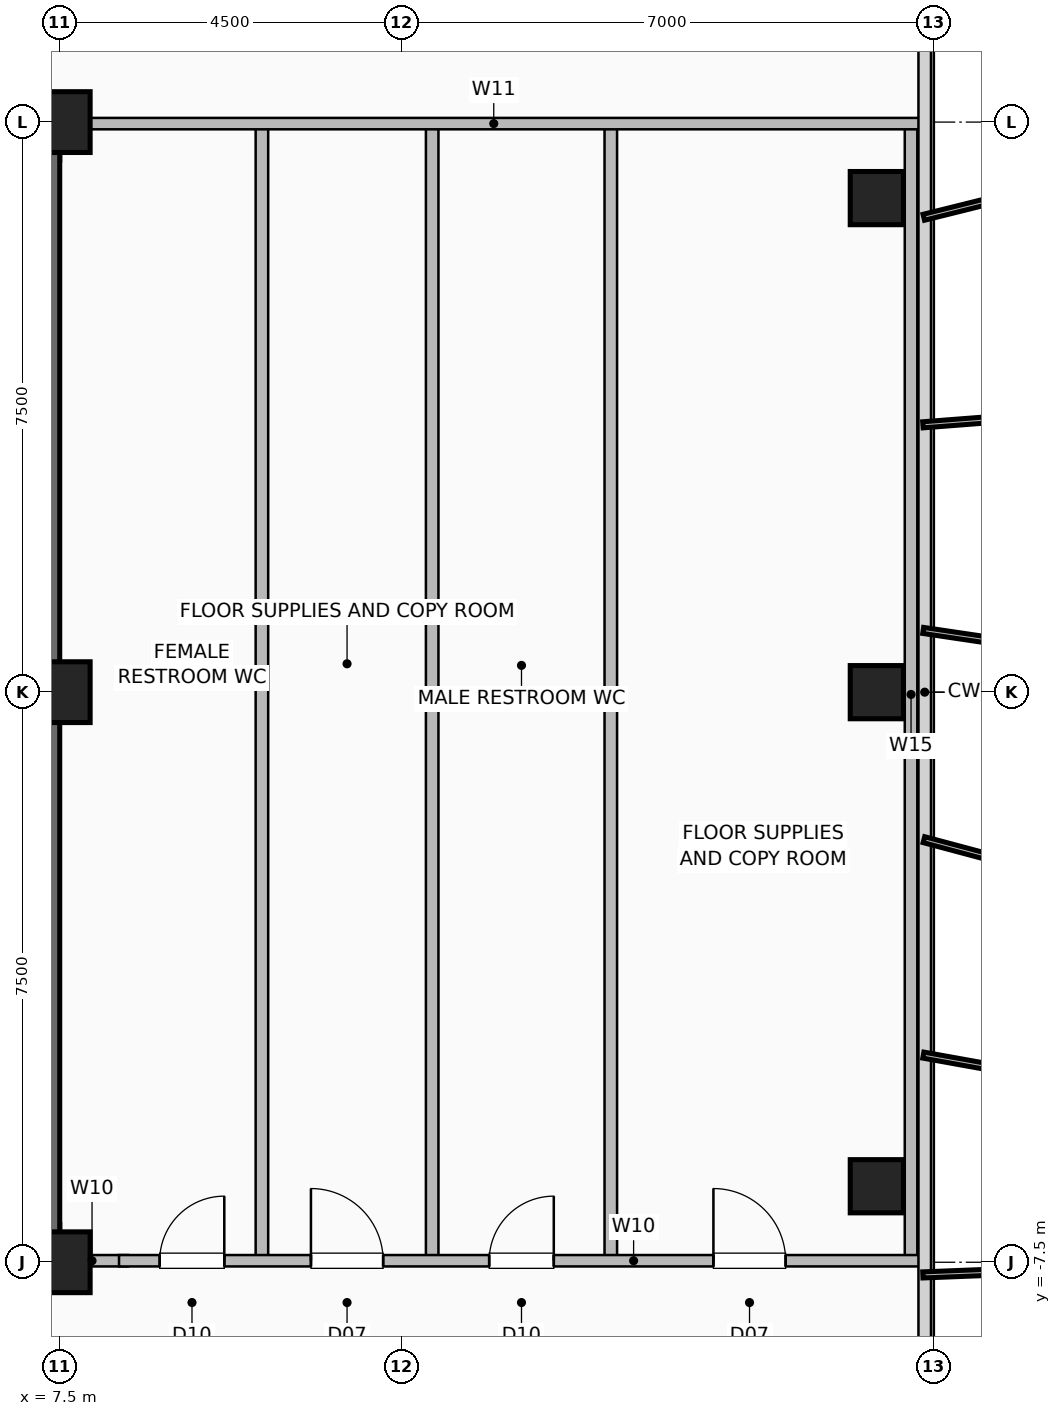
"""IFC4 building model, lengths in metres.
Left out: names, types, materials, properties, quantities, classifications, styles, units other than length and angle.
Written with IfcOpenShell. Run it as: python <this file> out.ifc"""

import sys

from ifc_helpers import new_model, si_unit, direction, frame, frame_2d, origin, origin_2d, place, context, subcontext, project, spatial, rectangle, hollow_rectangle, extrude, element, fill, save


model = new_model("IFC4")
c1 = context("Model", 3, precision=1e-05, world=origin(), true_north=direction((0.0, 1.0)))
c2 = subcontext(c1, "Body", "Model", "MODEL_VIEW")
j1 = project(units=[si_unit("LENGTHUNIT", "METRE"), si_unit("PLANEANGLEUNIT", "RADIAN")], contexts=[c1])
p1 = place(None, origin())
s1 = spatial("IfcSite", under=j1, at=p1, CompositionType="ELEMENT")
p2 = place(p1, origin())
s2 = spatial("IfcBuilding", under=s1, at=p2, CompositionType="ELEMENT")
p3 = place(p2, frame((0.0, 0.0, 261.2)))
s3 = spatial("IfcBuildingStorey", under=s2, at=p3, CompositionType="ELEMENT", Elevation=261.2)
for number, where, z_axis, x_axis in (
    (1, (7.5, -7.5, 0.0), (0.0, 0.0, 1.0), (1.0, 0.0, 0.0)),
    (2, (7.5, 0.0, 0.0), (0.0, 0.0, 1.0), (1.0, 0.0, 0.0)),
    (3, (7.5, 7.5, 0.0), (0.0, 0.0, 1.0), (1.0, 0.0, 0.0)),
):
    element("IfcColumn", number, at=place(p3, frame(where, z_axis=z_axis, x_axis=x_axis)), inside=s3, PredefinedType="COLUMN", context=c2, shape_type="SweptSolid", body=[
        extrude(hollow_rectangle(XDim=0.8, YDim=0.8, WallThickness=0.04, at=origin_2d()), origin(), (0.0, 0.0, 1.0), 3.6),
    ])
for number, where, z_axis, x_axis in (
    (4, (18.25, -6.5, 0.0), (0.0, 0.0, 1.0), (1.0, 0.0, 0.0)),
    (5, (18.25, 0.0, 0.0), (0.0, 0.0, 1.0), (1.0, 0.0, 0.0)),
    (6, (18.25, 6.5, 0.0), (0.0, 0.0, 1.0), (1.0, 0.0, 0.0)),
):
    element("IfcColumn", number, at=place(p3, frame(where, z_axis=z_axis, x_axis=x_axis)), inside=s3, PredefinedType="COLUMN", context=c2, shape_type="SweptSolid", body=[
        extrude(hollow_rectangle(XDim=0.7, YDim=0.7, WallThickness=0.035, at=origin_2d()), origin(), (0.0, 0.0, 1.0), 3.6),
    ])
p4 = place(p3, frame((-7.5, -7.25, 0.0), z_axis=(0.0, 0.0, 1.0), x_axis=(1.0, 0.0, 0.0)))
e7 = element("IfcWall", 7, at=p4, inside=s3, PredefinedType="SHEAR", context=c2, shape_type="SweptSolid", body=[
    extrude(rectangle(XDim=15.0, YDim=0.5, at=frame_2d((7.5, 0.0))), origin(), (0.0, 0.0, 1.0), 3.36),
])
p5 = place(p4, frame((1.55, 0.0, 0.0)))
e8 = element("IfcOpeningElement", 8, at=p5, cuts=e7, PredefinedType="OPENING", context=c2, shape_type="SweptSolid", body=[
    extrude(rectangle(XDim=1.05, YDim=2.08, at=frame_2d((0.525, 1.04))), frame((0.0, 0.26, 0.0), z_axis=(0.0, -1.0, 0.0), x_axis=(1.0, 0.0, 0.0)), (0.0, 0.0, 1.0), 0.52),
])
p6 = place(p4, frame((12.4, 0.0, 0.0)))
e9 = element("IfcOpeningElement", 9, at=p6, cuts=e7, PredefinedType="OPENING", context=c2, shape_type="SweptSolid", body=[
    extrude(rectangle(XDim=1.05, YDim=2.08, at=frame_2d((0.525, 1.04))), frame((0.0, 0.26, 0.0), z_axis=(0.0, -1.0, 0.0), x_axis=(1.0, 0.0, 0.0)), (0.0, 0.0, 1.0), 0.52),
])
p7 = place(p4, frame((5.2, 0.0, 0.0)))
e10 = element("IfcOpeningElement", 10, at=p7, cuts=e7, PredefinedType="OPENING", context=c2, shape_type="SweptSolid", body=[
    extrude(rectangle(XDim=1.0, YDim=2.08, at=frame_2d((0.5, 1.04))), frame((0.0, 0.26, 0.0), z_axis=(0.0, -1.0, 0.0), x_axis=(1.0, 0.0, 0.0)), (0.0, 0.0, 1.0), 0.52),
])
p8 = place(p4, frame((8.65, 0.0, 0.0)))
e11 = element("IfcOpeningElement", 11, at=p8, cuts=e7, PredefinedType="OPENING", context=c2, shape_type="SweptSolid", body=[
    extrude(rectangle(XDim=1.0, YDim=2.08, at=frame_2d((0.5, 1.04))), frame((0.0, 0.26, 0.0), z_axis=(0.0, -1.0, 0.0), x_axis=(1.0, 0.0, 0.0)), (0.0, 0.0, 1.0), 0.52),
])
for number, where, z_axis, x_axis in (
    (12, (-7.5, 7.25, 0.0), (0.0, 0.0, 1.0), (1.0, 0.0, 0.0)),
    (13, (7.25, -7.5, 0.0), (0.0, 0.0, 1.0), (0.0, 1.0, 0.0)),
):
    element("IfcWall", number, at=place(p3, frame(where, z_axis=z_axis, x_axis=x_axis)), inside=s3, PredefinedType="SHEAR", context=c2, shape_type="SweptSolid", body=[
        extrude(rectangle(XDim=15.0, YDim=0.5, at=frame_2d((7.5, 0.0))), origin(), (0.0, 0.0, 1.0), 3.36),
    ])
p9 = place(p3, frame((7.45, -7.48, 0.0), z_axis=(0.0, 0.0, 1.0), x_axis=(1.0, 0.0, 0.0)))
e14 = element("IfcWall", 14, at=p9, inside=s3, PredefinedType="PARTITIONING", context=c2, shape_type="SweptSolid", body=[
    extrude(rectangle(XDim=0.95, YDim=0.15, at=frame_2d((0.475, 0.0))), origin(), (0.0, 0.0, 1.0), 3.36),
])
for number, where, z_axis, x_axis in (
    (15, (10.16, -7.48, 0.0), (0.0, 0.0, 1.0), (0.0, 1.0, 0.0)),
    (16, (14.75, -7.48, 0.0), (0.0, 0.0, 1.0), (0.0, 1.0, 0.0)),
    (17, (12.4, -7.48, 0.0), (0.0, 0.0, 1.0), (0.0, 1.0, 0.0)),
    (18, (18.7, -7.48, 0.0), (0.0, 0.0, 1.0), (0.0, 1.0, 0.0)),
):
    element("IfcWall", number, at=place(p3, frame(where, z_axis=z_axis, x_axis=x_axis)), inside=s3, PredefinedType="PLUMBINGWALL", context=c2, shape_type="SweptSolid", body=[
        extrude(rectangle(XDim=14.9, YDim=0.165, at=frame_2d((7.45, 0.0))), origin(), (0.0, 0.0, 1.0), 3.36),
    ])
p10 = place(p3, frame((8.28, -7.48, 0.0), z_axis=(0.0, 0.0, 1.0), x_axis=(1.0, 0.0, 0.0)))
e19 = element("IfcWall", 19, at=p10, inside=s3, PredefinedType="PARTITIONING", context=c2, shape_type="SweptSolid", body=[
    extrude(rectangle(XDim=10.54, YDim=0.15, at=frame_2d((5.27, 0.0))), origin(), (0.0, 0.0, 1.0), 3.36),
])
p11 = place(p10, frame((0.535, 0.0, 0.0)))
e20 = element("IfcOpeningElement", 20, at=p11, cuts=e19, PredefinedType="OPENING", context=c2, shape_type="SweptSolid", body=[
    extrude(rectangle(XDim=0.85, YDim=2.05, at=frame_2d((0.425, 1.025))), frame((0.0, 0.085, 0.0), z_axis=(0.0, -1.0, 0.0), x_axis=(1.0, 0.0, 0.0)), (0.0, 0.0, 1.0), 0.17),
])
p12 = place(p10, frame((2.525, 0.0, 0.0)))
e21 = element("IfcOpeningElement", 21, at=p12, cuts=e19, PredefinedType="OPENING", context=c2, shape_type="SweptSolid", body=[
    extrude(rectangle(XDim=0.95, YDim=2.06, at=frame_2d((0.475, 1.03))), frame((0.0, 0.085, 0.0), z_axis=(0.0, -1.0, 0.0), x_axis=(1.0, 0.0, 0.0)), (0.0, 0.0, 1.0), 0.17),
])
p13 = place(p10, frame((4.87, 0.0, 0.0)))
e22 = element("IfcOpeningElement", 22, at=p13, cuts=e19, PredefinedType="OPENING", context=c2, shape_type="SweptSolid", body=[
    extrude(rectangle(XDim=0.85, YDim=2.05, at=frame_2d((0.425, 1.025))), frame((0.0, 0.085, 0.0), z_axis=(0.0, -1.0, 0.0), x_axis=(1.0, 0.0, 0.0)), (0.0, 0.0, 1.0), 0.17),
])
p14 = place(p10, frame((7.82, 0.0, 0.0)))
e23 = element("IfcOpeningElement", 23, at=p14, cuts=e19, PredefinedType="OPENING", context=c2, shape_type="SweptSolid", body=[
    extrude(rectangle(XDim=0.95, YDim=2.06, at=frame_2d((0.475, 1.03))), frame((0.0, 0.085, 0.0), z_axis=(0.0, -1.0, 0.0), x_axis=(1.0, 0.0, 0.0)), (0.0, 0.0, 1.0), 0.17),
])
p15 = place(p3, frame((7.6, 7.48, 0.0), z_axis=(0.0, 0.0, 1.0), x_axis=(1.0, 0.0, 0.0)))
e24 = element("IfcWall", 24, at=p15, inside=s3, PredefinedType="PARTITIONING", context=c2, shape_type="SweptSolid", body=[
    extrude(rectangle(XDim=11.22, YDim=0.15, at=frame_2d((5.61, 0.0))), origin(), (0.0, 0.0, 1.0), 3.36),
])
p16 = place(p11, origin())
e25 = element("IfcDoor", 25, at=p16, inside=s3, OperationType="SINGLE_SWING_RIGHT", PredefinedType="DOOR", context=c2, shape_type="SweptSolid", body=[
    extrude(rectangle(XDim=0.85, YDim=2.05, at=frame_2d((0.425, 1.025))), frame((0.0, 0.025, 0.0), z_axis=(0.0, -1.0, 0.0), x_axis=(1.0, 0.0, 0.0)), (0.0, 0.0, 1.0), 0.05),
])
fill(e20, e25)
p17 = place(p12, origin())
e26 = element("IfcDoor", 26, at=p17, inside=s3, OperationType="SINGLE_SWING_LEFT", PredefinedType="DOOR", context=c2, shape_type="SweptSolid", body=[
    extrude(rectangle(XDim=0.95, YDim=2.06, at=frame_2d((0.475, 1.03))), frame((0.0, 0.025, 0.0), z_axis=(0.0, -1.0, 0.0), x_axis=(1.0, 0.0, 0.0)), (0.0, 0.0, 1.0), 0.05),
])
fill(e21, e26)
p18 = place(p13, origin())
e27 = element("IfcDoor", 27, at=p18, inside=s3, OperationType="SINGLE_SWING_RIGHT", PredefinedType="DOOR", context=c2, shape_type="SweptSolid", body=[
    extrude(rectangle(XDim=0.85, YDim=2.05, at=frame_2d((0.425, 1.025))), frame((0.0, 0.025, 0.0), z_axis=(0.0, -1.0, 0.0), x_axis=(1.0, 0.0, 0.0)), (0.0, 0.0, 1.0), 0.05),
])
fill(e22, e27)
p19 = place(p14, origin())
e28 = element("IfcDoor", 28, at=p19, inside=s3, OperationType="SINGLE_SWING_LEFT", PredefinedType="DOOR", context=c2, shape_type="SweptSolid", body=[
    extrude(rectangle(XDim=0.95, YDim=2.06, at=frame_2d((0.475, 1.03))), frame((0.0, 0.025, 0.0), z_axis=(0.0, -1.0, 0.0), x_axis=(1.0, 0.0, 0.0)), (0.0, 0.0, 1.0), 0.05),
])
fill(e23, e28)
save(model, sys.argv[1])
